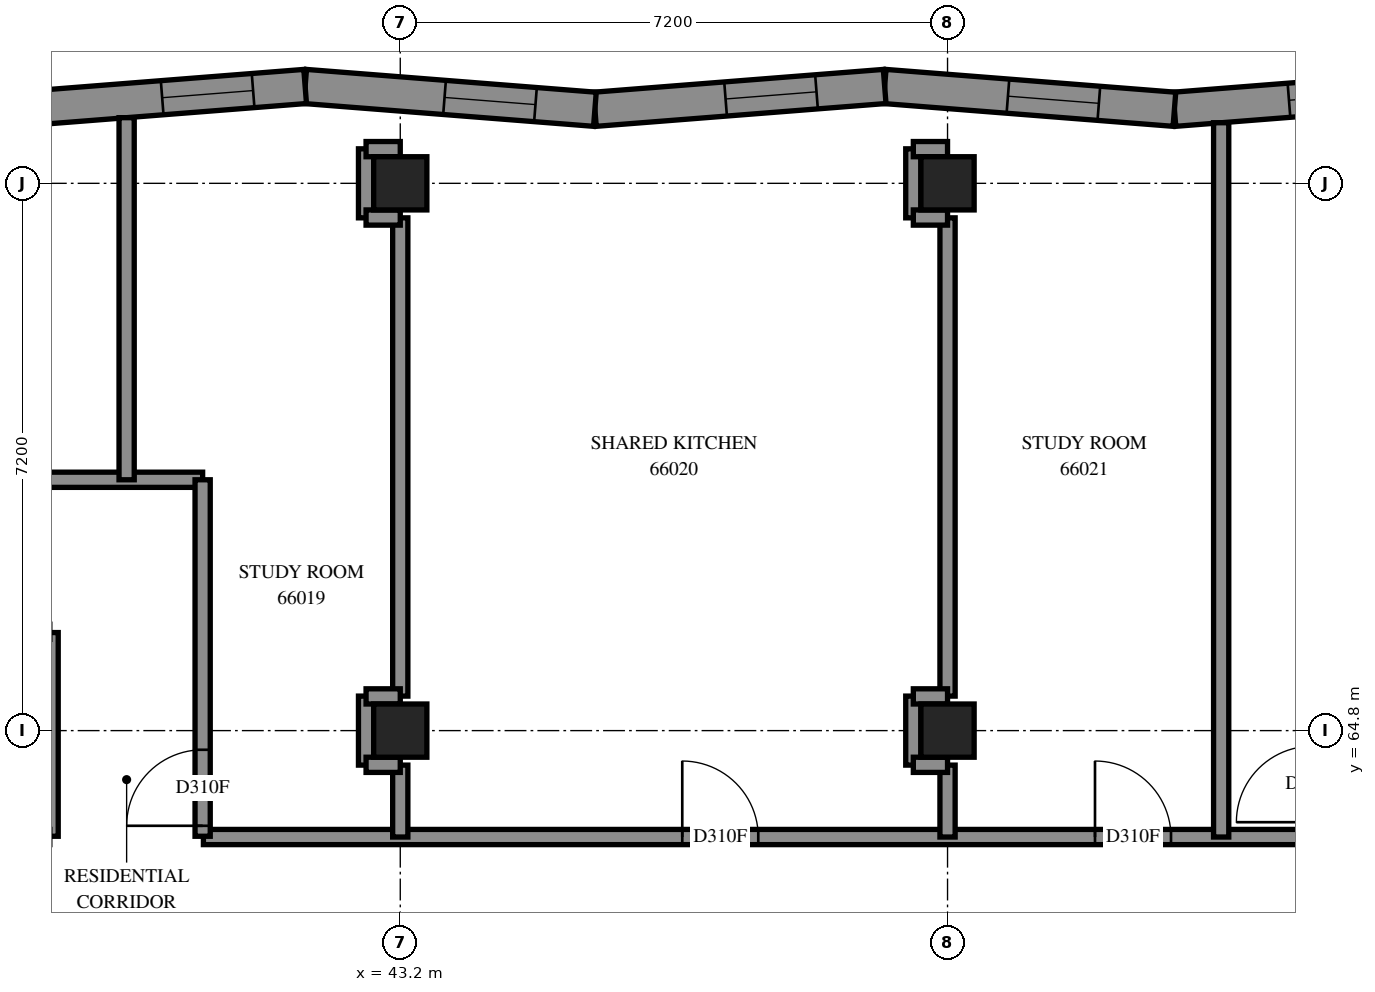
"""IFC4 building model, lengths in metres.
Left out: names, types, materials, properties, quantities, classifications, styles, units other than length and angle.
Written with IfcOpenShell. Run it as: python <this file> out.ifc"""

import sys

from ifc_helpers import new_model, si_unit, direction, frame, frame_2d, origin, origin_2d, place, context, subcontext, project, spatial, polyline, rectangle, outline, extrude, element, fill, save


model = new_model("IFC4")
c1 = context("Model", 3, precision=1e-05, world=origin(), true_north=direction((0.0, 1.0)))
c2 = subcontext(c1, "Body", "Model", "MODEL_VIEW")
j1 = project(units=[si_unit("LENGTHUNIT", "METRE"), si_unit("PLANEANGLEUNIT", "RADIAN")], contexts=[c1])
p1 = place(None, origin())
s1 = spatial("IfcSite", under=j1, at=p1, CompositionType="ELEMENT")
p2 = place(p1, origin())
s2 = spatial("IfcBuilding", under=s1, at=p2, CompositionType="ELEMENT")
p3 = place(p2, frame((0.0, 0.0, 243.8)))
s3 = spatial("IfcBuildingStorey", under=s2, at=p3, CompositionType="ELEMENT", Elevation=243.8)
for number, where, z_axis, x_axis in (
    (1, (43.2, 64.8, 0.0), (0.0, 0.0, 1.0), (1.0, 0.0, 0.0)),
    (2, (43.2, 72.0, 0.0), (0.0, 0.0, 1.0), (1.0, 0.0, 0.0)),
    (3, (50.4, 64.8, 0.0), (0.0, 0.0, 1.0), (1.0, 0.0, 0.0)),
    (4, (50.4, 72.0, 0.0), (0.0, 0.0, 1.0), (1.0, 0.0, 0.0)),
):
    element("IfcColumn", number, at=place(p3, frame(where, z_axis=z_axis, x_axis=x_axis)), inside=s3, PredefinedType="COLUMN", context=c2, shape_type="SweptSolid", body=[
        extrude(rectangle(XDim=0.7, YDim=0.7, at=origin_2d()), origin(), (0.0, 0.0, 1.0), 3.1),
    ])
p4 = place(p3, frame((57.197, 73.274, 0.0), z_axis=(0.0, 0.0, 1.0), x_axis=(-0.9969178788, -0.0784521703, 0.0)))
e5 = element("IfcWall", 5, at=p4, inside=s3, PredefinedType="SOLIDWALL", context=c2, shape_type="SweptSolid", body=[
    extrude(outline(polyline([(-0.018, -0.225), (3.806, -0.225), (3.842, 0.225), (0.018, 0.225), (-0.018, -0.225)])), origin(), (0.0, 0.0, 1.0), 3.1),
])
p5 = place(p4, frame((1.112, 0.0, 0.45)))
e6 = element("IfcOpeningElement", 6, at=p5, cuts=e5, PredefinedType="OPENING", context=c2, shape_type="SweptSolid", body=[
    extrude(rectangle(XDim=1.2, YDim=2.55, at=frame_2d((0.6, 1.275))), frame((0.0, 0.235, 0.0), z_axis=(0.0, -1.0, 0.0), x_axis=(1.0, 0.0, 0.0)), (0.0, 0.0, 1.0), 0.47),
])
p6 = place(p3, frame((53.385, 72.974, 0.0), z_axis=(0.0, 0.0, 1.0), x_axis=(-0.9969177178, 0.0784542156, 0.0)))
e7 = element("IfcWall", 7, at=p6, inside=s3, PredefinedType="SOLIDWALL", context=c2, shape_type="SweptSolid", body=[
    extrude(outline(polyline([(0.018, -0.225), (3.842, -0.225), (3.806, 0.225), (-0.018, 0.225), (0.018, -0.225)])), origin(), (0.0, 0.0, 1.0), 3.1),
])
p7 = place(p6, frame((0.997, 0.0, 0.45)))
e8 = element("IfcOpeningElement", 8, at=p7, cuts=e7, PredefinedType="OPENING", context=c2, shape_type="SweptSolid", body=[
    extrude(rectangle(XDim=1.2, YDim=2.55, at=frame_2d((0.6, 1.275))), frame((0.0, 0.235, 0.0), z_axis=(0.0, -1.0, 0.0), x_axis=(1.0, 0.0, 0.0)), (0.0, 0.0, 1.0), 0.47),
])
p8 = place(p3, frame((49.573, 73.274, 0.0), z_axis=(0.0, 0.0, 1.0), x_axis=(-0.9969177178, -0.0784542156, 0.0)))
e9 = element("IfcWall", 9, at=p8, inside=s3, PredefinedType="SOLIDWALL", context=c2, shape_type="SweptSolid", body=[
    extrude(outline(polyline([(-0.018, -0.225), (3.806, -0.225), (3.842, 0.225), (0.018, 0.225), (-0.018, -0.225)])), origin(), (0.0, 0.0, 1.0), 3.1),
])
p9 = place(p8, frame((0.899, 0.0, 0.45)))
e10 = element("IfcOpeningElement", 10, at=p9, cuts=e9, PredefinedType="OPENING", context=c2, shape_type="SweptSolid", body=[
    extrude(rectangle(XDim=1.2, YDim=2.55, at=frame_2d((0.6, 1.275))), frame((0.0, 0.235, 0.0), z_axis=(0.0, -1.0, 0.0), x_axis=(1.0, 0.0, 0.0)), (0.0, 0.0, 1.0), 0.47),
])
p10 = place(p3, frame((45.761, 72.974, 0.0), z_axis=(0.0, 0.0, 1.0), x_axis=(-0.9969178788, 0.0784521703, 0.0)))
e11 = element("IfcWall", 11, at=p10, inside=s3, PredefinedType="SOLIDWALL", context=c2, shape_type="SweptSolid", body=[
    extrude(outline(polyline([(0.018, -0.225), (3.842, -0.225), (3.806, 0.225), (-0.018, 0.225), (0.018, -0.225)])), origin(), (0.0, 0.0, 1.0), 3.1),
])
p11 = place(p10, frame((0.784, 0.0, 0.45)))
e12 = element("IfcOpeningElement", 12, at=p11, cuts=e11, PredefinedType="OPENING", context=c2, shape_type="SweptSolid", body=[
    extrude(rectangle(XDim=1.2, YDim=2.55, at=frame_2d((0.6, 1.275))), frame((0.0, 0.235, 0.0), z_axis=(0.0, -1.0, 0.0), x_axis=(1.0, 0.0, 0.0)), (0.0, 0.0, 1.0), 0.47),
])
p12 = place(p3, frame((41.949, 73.274, 0.0), z_axis=(0.0, 0.0, 1.0), x_axis=(-0.9969177178, -0.0784542156, 0.0)))
e13 = element("IfcWall", 13, at=p12, inside=s3, PredefinedType="SOLIDWALL", context=c2, shape_type="SweptSolid", body=[
    extrude(outline(polyline([(-0.018, -0.225), (3.806, -0.225), (3.842, 0.225), (0.018, 0.225), (-0.018, -0.225)])), origin(), (0.0, 0.0, 1.0), 3.1),
])
p13 = place(p12, frame((0.687, 0.0, 0.45)))
e14 = element("IfcOpeningElement", 14, at=p13, cuts=e13, PredefinedType="OPENING", context=c2, shape_type="SweptSolid", body=[
    extrude(rectangle(XDim=1.2, YDim=2.55, at=frame_2d((0.6, 1.275))), frame((0.0, 0.235, 0.0), z_axis=(0.0, -1.0, 0.0), x_axis=(1.0, 0.0, 0.0)), (0.0, 0.0, 1.0), 0.47),
])
p14 = place(p3, frame((40.61, 63.4, 0.0), z_axis=(0.0, 0.0, 1.0), x_axis=(1.0, 0.0, 0.0)))
e15 = element("IfcWall", 15, at=p14, inside=s3, PredefinedType="PARTITIONING", context=c2, shape_type="SweptSolid", body=[
    extrude(rectangle(XDim=14.59, YDim=0.2, at=frame_2d((7.295, 0.0))), origin(), (0.0, 0.0, 1.0), 3.1),
])
p15 = place(p14, frame((6.3, 0.0, 0.0)))
e16 = element("IfcOpeningElement", 16, at=p15, cuts=e15, PredefinedType="OPENING", context=c2, shape_type="SweptSolid", body=[
    extrude(rectangle(XDim=1.0, YDim=2.1, at=frame_2d((0.5, 1.05))), frame((0.0, 0.11, 0.0), z_axis=(0.0, -1.0, 0.0), x_axis=(1.0, 0.0, 0.0)), (0.0, 0.0, 1.0), 0.22),
])
p16 = place(p14, frame((11.73, 0.0, 0.0)))
e17 = element("IfcOpeningElement", 17, at=p16, cuts=e15, PredefinedType="OPENING", context=c2, shape_type="SweptSolid", body=[
    extrude(rectangle(XDim=1.0, YDim=2.1, at=frame_2d((0.5, 1.05))), frame((0.0, 0.11, 0.0), z_axis=(0.0, -1.0, 0.0), x_axis=(1.0, 0.0, 0.0)), (0.0, 0.0, 1.0), 0.22),
])
p17 = place(p3, frame((54.0, 63.4, 0.0), z_axis=(0.0, 0.0, 1.0), x_axis=(0.0, 1.0, 0.0)))
e18 = element("IfcWall", 18, at=p17, inside=s3, PredefinedType="PARTITIONING", context=c2, shape_type="SweptSolid", body=[
    extrude(rectangle(XDim=9.397, YDim=0.2, at=frame_2d((4.699, 0.0))), origin(), (0.0, 0.0, 1.0), 3.1),
])
for number, where, z_axis, x_axis in (
    (19, (43.2, 65.254, 0.0), (0.0, 0.0, 1.0), (0.0, 1.0, 0.0)),
    (20, (50.4, 65.254, 0.0), (0.0, 0.0, 1.0), (0.0, 1.0, 0.0)),
):
    element("IfcWall", number, at=place(p3, frame(where, z_axis=z_axis, x_axis=x_axis)), inside=s3, PredefinedType="PARTITIONING", context=c2, shape_type="SweptSolid", body=[
        extrude(rectangle(XDim=6.292, YDim=0.2, at=frame_2d((3.146, 0.0))), origin(), (0.0, 0.0, 1.0), 3.1),
    ])
p18 = place(p3, frame((35.246, 68.1, 0.0), z_axis=(0.0, 0.0, 1.0), x_axis=(1.0, 0.0, 0.0)))
e21 = element("IfcWall", 21, at=p18, inside=s3, PredefinedType="PARTITIONING", context=c2, shape_type="SweptSolid", body=[
    extrude(rectangle(XDim=5.354, YDim=0.2, at=frame_2d((2.677, 0.0))), origin(), (0.0, 0.0, 1.0), 3.1),
])
p19 = place(p18, frame((0.254, 0.0, 0.0)))
e22 = element("IfcOpeningElement", 22, at=p19, cuts=e21, PredefinedType="OPENING", context=c2, shape_type="SweptSolid", body=[
    extrude(rectangle(XDim=1.0, YDim=2.1, at=frame_2d((0.5, 1.05))), frame((0.0, 0.11, 0.0), z_axis=(0.0, -1.0, 0.0), x_axis=(1.0, 0.0, 0.0)), (0.0, 0.0, 1.0), 0.22),
])
p20 = place(p3, frame((39.6, 68.1, 0.0), z_axis=(0.0, 0.0, 1.0), x_axis=(0.0, 1.0, 0.0)))
e23 = element("IfcWall", 23, at=p20, inside=s3, PredefinedType="PARTITIONING", context=c2, shape_type="SweptSolid", body=[
    extrude(rectangle(XDim=4.764, YDim=0.2, at=frame_2d((2.382, 0.0))), origin(), (0.0, 0.0, 1.0), 3.1),
])
p21 = place(p3, frame((40.6, 63.41, 0.0), z_axis=(0.0, 0.0, 1.0), x_axis=(0.0, 1.0, 0.0)))
e24 = element("IfcWall", 24, at=p21, inside=s3, PredefinedType="PARTITIONING", context=c2, shape_type="SweptSolid", body=[
    extrude(rectangle(XDim=4.69, YDim=0.2, at=frame_2d((2.345, 0.0))), origin(), (0.0, 0.0, 1.0), 3.1),
])
p22 = place(p21, frame((0.138, 0.0, 0.0)))
e25 = element("IfcOpeningElement", 25, at=p22, cuts=e24, PredefinedType="OPENING", context=c2, shape_type="SweptSolid", body=[
    extrude(rectangle(XDim=1.0, YDim=2.1, at=frame_2d((0.5, 1.05))), frame((0.0, 0.11, 0.0), z_axis=(0.0, -1.0, 0.0), x_axis=(1.0, 0.0, 0.0)), (0.0, 0.0, 1.0), 0.22),
])
p23 = place(p3, frame((38.6, 63.41, 0.0), z_axis=(0.0, 0.0, 1.0), x_axis=(0.0, 1.0, 0.0)))
e26 = element("IfcWall", 26, at=p23, inside=s3, PredefinedType="PARTITIONING", context=c2, shape_type="SweptSolid", body=[
    extrude(rectangle(XDim=2.68, YDim=0.2, at=frame_2d((1.34, 0.0))), origin(), (0.0, 0.0, 1.0), 3.1),
])
for number, where, z_axis, x_axis in (
    (27, (43.2, 63.4, 0.0), (0.0, 0.0, 1.0), (0.0, 1.0, 0.0)),
    (28, (50.4, 63.4, 0.0), (0.0, 0.0, 1.0), (0.0, 1.0, 0.0)),
):
    element("IfcWall", number, at=place(p3, frame(where, z_axis=z_axis, x_axis=x_axis)), inside=s3, PredefinedType="PARTITIONING", context=c2, shape_type="SweptSolid", body=[
        extrude(rectangle(XDim=0.946, YDim=0.2, at=frame_2d((0.473, 0.0))), origin(), (0.0, 0.0, 1.0), 3.1),
    ])
for number, where, z_axis, x_axis in (
    (29, (42.75, 64.346, 0.0), (0.0, 0.0, 1.0), (0.0, 1.0, 0.0)),
    (30, (49.95, 64.346, 0.0), (0.0, 0.0, 1.0), (0.0, 1.0, 0.0)),
    (31, (42.75, 71.546, 0.0), (0.0, 0.0, 1.0), (0.0, 1.0, 0.0)),
    (32, (49.95, 71.546, 0.0), (0.0, 0.0, 1.0), (0.0, 1.0, 0.0)),
):
    element("IfcWall", number, at=place(p3, frame(where, z_axis=z_axis, x_axis=x_axis)), inside=s3, PredefinedType="PARTITIONING", context=c2, shape_type="SweptSolid", body=[
        extrude(rectangle(XDim=0.908, YDim=0.2, at=frame_2d((0.454, 0.0))), origin(), (0.0, 0.0, 1.0), 3.1),
    ])
for number, where, z_axis, x_axis in (
    (33, (42.75, 72.45, 0.0), (0.0, 0.0, 1.0), (1.0, 0.0, 0.0)),
    (34, (42.75, 71.55, 0.0), (0.0, 0.0, 1.0), (1.0, 0.0, 0.0)),
    (35, (42.75, 65.25, 0.0), (0.0, 0.0, 1.0), (1.0, 0.0, 0.0)),
    (36, (42.75, 64.35, 0.0), (0.0, 0.0, 1.0), (1.0, 0.0, 0.0)),
    (37, (49.95, 72.45, 0.0), (0.0, 0.0, 1.0), (1.0, 0.0, 0.0)),
    (38, (49.95, 71.55, 0.0), (0.0, 0.0, 1.0), (1.0, 0.0, 0.0)),
    (39, (49.95, 65.25, 0.0), (0.0, 0.0, 1.0), (1.0, 0.0, 0.0)),
    (40, (49.95, 64.35, 0.0), (0.0, 0.0, 1.0), (1.0, 0.0, 0.0)),
):
    element("IfcWall", number, at=place(p3, frame(where, z_axis=z_axis, x_axis=x_axis)), inside=s3, PredefinedType="PARTITIONING", context=c2, shape_type="SweptSolid", body=[
        extrude(rectangle(XDim=0.45, YDim=0.2, at=frame_2d((0.225, 0.0))), origin(), (0.0, 0.0, 1.0), 3.1),
    ])
p24 = place(p5, origin())
e41 = element("IfcWindow", 41, at=p24, inside=s3, PartitioningType="SINGLE_PANEL", PredefinedType="WINDOW", context=c2, shape_type="SweptSolid", body=[
    extrude(rectangle(XDim=1.2, YDim=2.55, at=frame_2d((0.6, 1.275))), frame((0.0, 0.205, 0.0), z_axis=(0.0, -1.0, 0.0), x_axis=(1.0, 0.0, 0.0)), (0.0, 0.0, 1.0), 0.06),
])
fill(e6, e41)
p25 = place(p7, origin())
e42 = element("IfcWindow", 42, at=p25, inside=s3, PartitioningType="SINGLE_PANEL", PredefinedType="WINDOW", context=c2, shape_type="SweptSolid", body=[
    extrude(rectangle(XDim=1.2, YDim=2.55, at=frame_2d((0.6, 1.275))), frame((0.0, 0.205, 0.0), z_axis=(0.0, -1.0, 0.0), x_axis=(1.0, 0.0, 0.0)), (0.0, 0.0, 1.0), 0.06),
])
fill(e8, e42)
p26 = place(p9, origin())
e43 = element("IfcWindow", 43, at=p26, inside=s3, PartitioningType="SINGLE_PANEL", PredefinedType="WINDOW", context=c2, shape_type="SweptSolid", body=[
    extrude(rectangle(XDim=1.2, YDim=2.55, at=frame_2d((0.6, 1.275))), frame((0.0, 0.205, 0.0), z_axis=(0.0, -1.0, 0.0), x_axis=(1.0, 0.0, 0.0)), (0.0, 0.0, 1.0), 0.06),
])
fill(e10, e43)
p27 = place(p11, origin())
e44 = element("IfcWindow", 44, at=p27, inside=s3, PartitioningType="SINGLE_PANEL", PredefinedType="WINDOW", context=c2, shape_type="SweptSolid", body=[
    extrude(rectangle(XDim=1.2, YDim=2.55, at=frame_2d((0.6, 1.275))), frame((0.0, 0.205, 0.0), z_axis=(0.0, -1.0, 0.0), x_axis=(1.0, 0.0, 0.0)), (0.0, 0.0, 1.0), 0.06),
])
fill(e12, e44)
p28 = place(p13, origin())
e45 = element("IfcWindow", 45, at=p28, inside=s3, PartitioningType="SINGLE_PANEL", PredefinedType="WINDOW", context=c2, shape_type="SweptSolid", body=[
    extrude(rectangle(XDim=1.2, YDim=2.55, at=frame_2d((0.6, 1.275))), frame((0.0, 0.205, 0.0), z_axis=(0.0, -1.0, 0.0), x_axis=(1.0, 0.0, 0.0)), (0.0, 0.0, 1.0), 0.06),
])
fill(e14, e45)
p29 = place(p22, origin())
e46 = element("IfcDoor", 46, at=p29, inside=s3, OperationType="SINGLE_SWING_LEFT", PredefinedType="DOOR", context=c2, shape_type="SweptSolid", body=[
    extrude(rectangle(XDim=1.0, YDim=2.1, at=frame_2d((0.5, 1.05))), frame((0.0, 0.025, 0.0), z_axis=(0.0, -1.0, 0.0), x_axis=(1.0, 0.0, 0.0)), (0.0, 0.0, 1.0), 0.05),
])
fill(e25, e46)
p30 = place(p15, origin())
e47 = element("IfcDoor", 47, at=p30, inside=s3, OperationType="SINGLE_SWING_RIGHT", PredefinedType="DOOR", context=c2, shape_type="SweptSolid", body=[
    extrude(rectangle(XDim=1.0, YDim=2.1, at=frame_2d((0.5, 1.05))), frame((0.0, 0.025, 0.0), z_axis=(0.0, -1.0, 0.0), x_axis=(1.0, 0.0, 0.0)), (0.0, 0.0, 1.0), 0.05),
])
fill(e16, e47)
p31 = place(p16, origin())
e48 = element("IfcDoor", 48, at=p31, inside=s3, OperationType="SINGLE_SWING_RIGHT", PredefinedType="DOOR", context=c2, shape_type="SweptSolid", body=[
    extrude(rectangle(XDim=1.0, YDim=2.1, at=frame_2d((0.5, 1.05))), frame((0.0, 0.025, 0.0), z_axis=(0.0, -1.0, 0.0), x_axis=(1.0, 0.0, 0.0)), (0.0, 0.0, 1.0), 0.05),
])
fill(e17, e48)
save(model, sys.argv[1])
